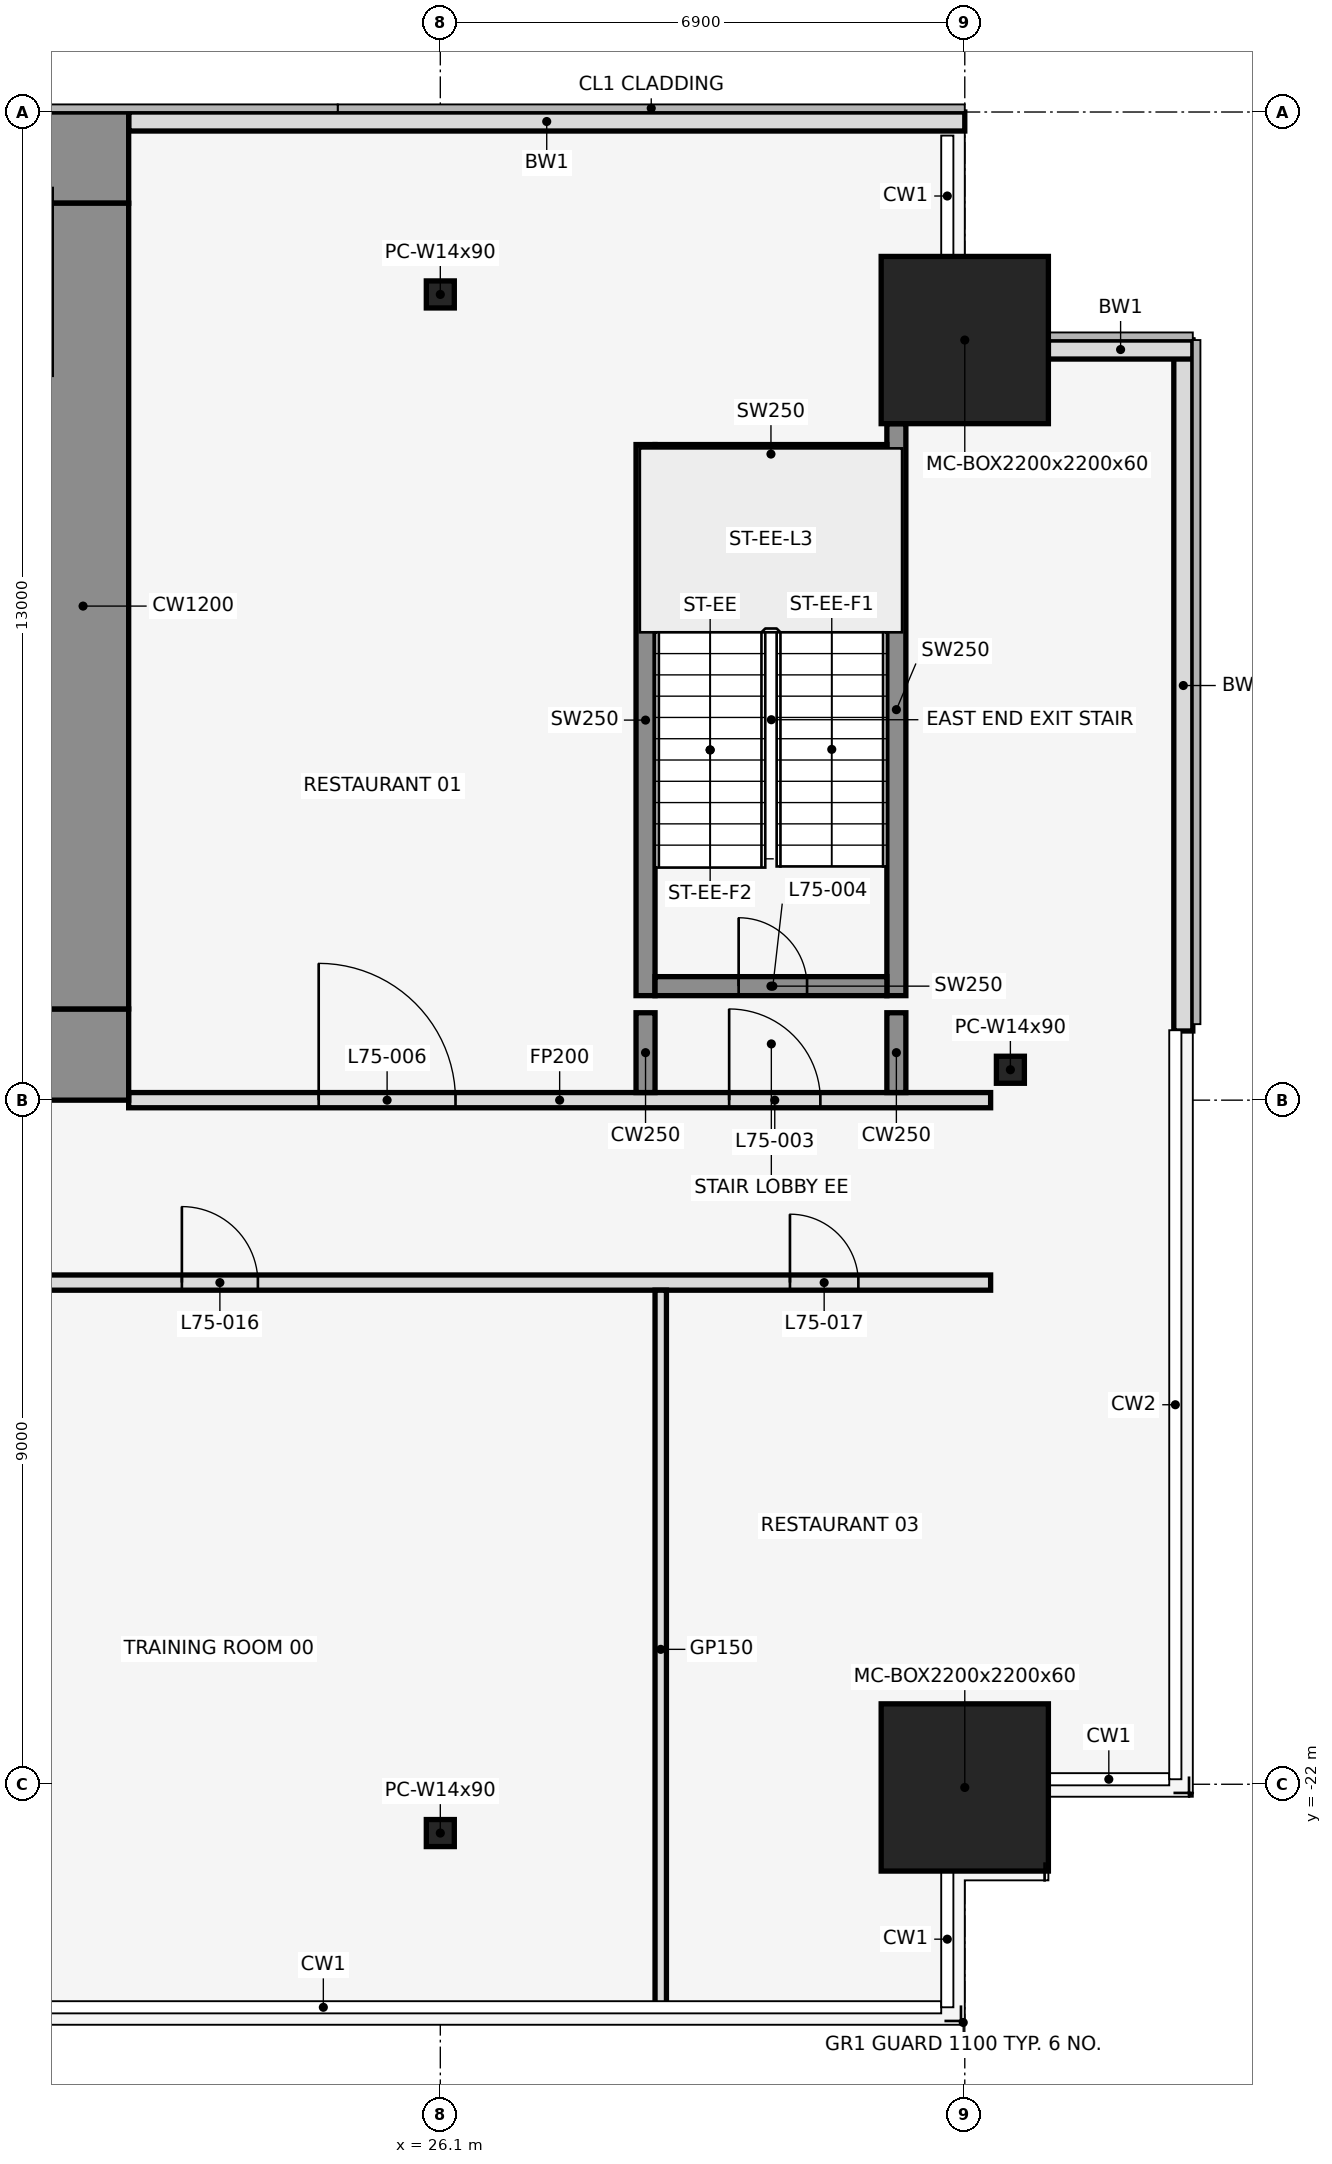
"""IFC4 building model, lengths in metres.
Left out: names, types, materials, properties, quantities, classifications, styles, units other than length and angle.
Written with IfcOpenShell. Run it as: python <this file> out.ifc"""

import sys

from ifc_helpers import new_model, si_unit, direction, frame, frame_2d, origin, origin_2d, place, context, subcontext, project, spatial, rectangle, hollow_rectangle, i_section, extrude, element, fill, save


model = new_model("IFC4")
c1 = context("Model", 3, precision=1e-05, world=origin(), true_north=direction((0.0, 1.0)))
c2 = subcontext(c1, "Body", "Model", "MODEL_VIEW")
j1 = project(units=[si_unit("LENGTHUNIT", "METRE"), si_unit("PLANEANGLEUNIT", "RADIAN")], contexts=[c1])
p1 = place(None, origin())
s1 = spatial("IfcSite", under=j1, at=p1, CompositionType="ELEMENT")
p2 = place(p1, origin())
s2 = spatial("IfcBuilding", under=s1, at=p2, CompositionType="ELEMENT")
p3 = place(p2, frame((0.0, 0.0, 333.5)))
s3 = spatial("IfcBuildingStorey", under=s2, at=p3, CompositionType="ELEMENT", Elevation=333.5)
for number, where, z_axis, x_axis in (
    (1, (26.1, -22.642, 0.0), (0.0, 0.0, 1.0), (1.0, 0.0, 0.0)),
    (2, (26.1, -2.4, 0.0), (0.0, 0.0, 1.0), (1.0, 0.0, 0.0)),
):
    element("IfcColumn", number, at=place(p3, frame(where, z_axis=z_axis, x_axis=x_axis)), inside=s3, PredefinedType="COLUMN", context=c2, shape_type="SweptSolid", body=[
        extrude(i_section(OverallWidth=0.368, OverallDepth=0.356, WebThickness=0.011, FlangeThickness=0.018, at=origin_2d()), origin(), (0.0, 0.0, 1.0), 4.5),
    ])
for number, where, z_axis, x_axis in (
    (3, (33.0, -22.042, 0.0), (0.0, 0.0, 1.0), (1.0, 0.0, 0.0)),
    (4, (33.0, -3.0, 0.0), (0.0, 0.0, 1.0), (1.0, 0.0, 0.0)),
):
    element("IfcColumn", number, at=place(p3, frame(where, z_axis=z_axis, x_axis=x_axis)), inside=s3, PredefinedType="COLUMN", context=c2, shape_type="SweptSolid", body=[
        extrude(hollow_rectangle(XDim=2.2, YDim=2.2, WallThickness=0.06, at=origin_2d()), origin(), (0.0, 0.0, 1.0), 4.5),
    ])
p4 = place(p3, frame((33.6, -12.6, 0.0), z_axis=(0.0, 0.0, 1.0), x_axis=(1.0, 0.0, 0.0)))
e5 = element("IfcColumn", 5, at=p4, inside=s3, PredefinedType="COLUMN", context=c2, shape_type="SweptSolid", body=[
    extrude(i_section(OverallWidth=0.368, OverallDepth=0.356, WebThickness=0.011, FlangeThickness=0.018, at=origin_2d()), origin(), (0.0, 0.0, 1.0), 4.5),
])
p5 = place(p3, frame((33.0, -0.125, 0.0), z_axis=(0.0, 0.0, 1.0), x_axis=(-1.0, 0.0, 0.0)))
e6 = element("IfcWall", 6, at=p5, inside=s3, PredefinedType="STANDARD", context=c2, shape_type="SweptSolid", body=[
    extrude(rectangle(XDim=11.0, YDim=0.25, at=frame_2d((5.5, 0.0))), origin(), (0.0, 0.0, 1.0), 4.35),
])
p6 = place(p3, frame((35.875, -12.09, 0.0), z_axis=(0.0, 0.0, 1.0), x_axis=(0.0, 1.0, 0.0)))
e7 = element("IfcWall", 7, at=p6, inside=s3, PredefinedType="STANDARD", context=c2, shape_type="SweptSolid", body=[
    extrude(rectangle(XDim=9.09, YDim=0.25, at=frame_2d((4.545, 0.0))), origin(), (0.0, 0.0, 1.0), 4.35),
])
p7 = place(p3, frame((36.0, -3.125, 0.0), z_axis=(0.0, 0.0, 1.0), x_axis=(-1.0, 0.0, 0.0)))
e8 = element("IfcWall", 8, at=p7, inside=s3, PredefinedType="STANDARD", context=c2, shape_type="SweptSolid", body=[
    extrude(rectangle(XDim=1.9, YDim=0.25, at=frame_2d((0.95, 0.0))), origin(), (0.0, 0.0, 1.0), 4.35),
])
p8 = place(p3, frame((28.8, -11.625, 0.0), z_axis=(0.0, 0.0, 1.0), x_axis=(0.0, 1.0, 0.0)))
e9 = element("IfcWall", 9, at=p8, inside=s3, PredefinedType="SHEAR", context=c2, shape_type="SweptSolid", body=[
    extrude(rectangle(XDim=7.25, YDim=0.25, at=frame_2d((3.625, 0.0))), origin(), (0.0, 0.0, 1.0), 4.5),
])
p9 = place(p3, frame((32.1, -11.625, 0.0), z_axis=(0.0, 0.0, 1.0), x_axis=(0.0, 1.0, 0.0)))
e10 = element("IfcWall", 10, at=p9, inside=s3, PredefinedType="SHEAR", context=c2, shape_type="SweptSolid", body=[
    extrude(rectangle(XDim=7.525, YDim=0.25, at=frame_2d((3.762, 0.0))), origin(), (0.0, 0.0, 1.0), 4.5),
])
p10 = place(p3, frame((28.925, -11.5, 0.0), z_axis=(0.0, 0.0, 1.0), x_axis=(1.0, 0.0, 0.0)))
e11 = element("IfcWall", 11, at=p10, inside=s3, PredefinedType="SHEAR", context=c2, shape_type="SweptSolid", body=[
    extrude(rectangle(XDim=3.05, YDim=0.25, at=frame_2d((1.525, 0.0))), origin(), (0.0, 0.0, 1.0), 4.5),
])
p11 = place(p10, frame((1.1, 0.0, 0.0)))
e12 = element("IfcOpeningElement", 12, at=p11, cuts=e11, PredefinedType="OPENING", context=c2, shape_type="SweptSolid", body=[
    extrude(rectangle(XDim=0.9, YDim=2.1, at=frame_2d((0.45, 1.05))), frame((0.0, 0.137, 0.0), z_axis=(0.0, -1.0, 0.0), x_axis=(1.0, 0.0, 0.0)), (0.0, 0.0, 1.0), 0.274),
])
p12 = place(p3, frame((28.925, -4.5, 0.0), z_axis=(0.0, 0.0, 1.0), x_axis=(1.0, 0.0, 0.0)))
e13 = element("IfcWall", 13, at=p12, inside=s3, PredefinedType="SHEAR", context=c2, shape_type="SweptSolid", body=[
    extrude(rectangle(XDim=3.05, YDim=0.25, at=frame_2d((1.525, 0.0))), origin(), (0.0, 0.0, 1.0), 4.5),
])
p13 = place(p3, frame((1.4, -15.4, 0.0), z_axis=(0.0, 0.0, 1.0), x_axis=(1.0, 0.0, 0.0)))
e14 = element("IfcWall", 14, at=p13, inside=s3, PredefinedType="PARTITIONING", context=c2, shape_type="SweptSolid", body=[
    extrude(rectangle(XDim=31.94, YDim=0.2, at=frame_2d((15.97, 0.0))), origin(), (0.0, 0.0, 1.0), 3.339),
])
p14 = place(p13, frame((1.7, 0.0, 0.0)))
e15 = element("IfcOpeningElement", 15, at=p14, cuts=e14, PredefinedType="OPENING", context=c2, shape_type="SweptSolid", body=[
    extrude(rectangle(XDim=1.0, YDim=2.1, at=frame_2d((0.5, 1.05))), frame((0.0, 0.112, 0.0), z_axis=(0.0, -1.0, 0.0), x_axis=(1.0, 0.0, 0.0)), (0.0, 0.0, 1.0), 0.224),
])
p15 = place(p13, frame((9.3, 0.0, 0.0)))
e16 = element("IfcOpeningElement", 16, at=p15, cuts=e14, PredefinedType="OPENING", context=c2, shape_type="SweptSolid", body=[
    extrude(rectangle(XDim=1.8, YDim=2.1, at=frame_2d((0.9, 1.05))), frame((0.0, 0.112, 0.0), z_axis=(0.0, -1.0, 0.0), x_axis=(1.0, 0.0, 0.0)), (0.0, 0.0, 1.0), 0.224),
])
p16 = place(p13, frame((21.3, 0.0, 0.0)))
e17 = element("IfcOpeningElement", 17, at=p16, cuts=e14, PredefinedType="OPENING", context=c2, shape_type="SweptSolid", body=[
    extrude(rectangle(XDim=1.0, YDim=2.1, at=frame_2d((0.5, 1.05))), frame((0.0, 0.112, 0.0), z_axis=(0.0, -1.0, 0.0), x_axis=(1.0, 0.0, 0.0)), (0.0, 0.0, 1.0), 0.224),
])
p17 = place(p13, frame((29.3, 0.0, 0.0)))
e18 = element("IfcOpeningElement", 18, at=p17, cuts=e14, PredefinedType="OPENING", context=c2, shape_type="SweptSolid", body=[
    extrude(rectangle(XDim=0.9, YDim=2.1, at=frame_2d((0.45, 1.05))), frame((0.0, 0.112, 0.0), z_axis=(0.0, -1.0, 0.0), x_axis=(1.0, 0.0, 0.0)), (0.0, 0.0, 1.0), 0.224),
])
p18 = place(p3, frame((22.0, -13.0, 0.0), z_axis=(0.0, 0.0, 1.0), x_axis=(1.0, 0.0, 0.0)))
e19 = element("IfcWall", 19, at=p18, inside=s3, PredefinedType="PARTITIONING", context=c2, shape_type="SweptSolid", body=[
    extrude(rectangle(XDim=11.34, YDim=0.2, at=frame_2d((5.67, 0.0))), origin(), (0.0, 0.0, 1.0), 3.339),
])
p19 = place(p18, frame((7.9, 0.0, 0.0)))
e20 = element("IfcOpeningElement", 20, at=p19, cuts=e19, PredefinedType="OPENING", context=c2, shape_type="SweptSolid", body=[
    extrude(rectangle(XDim=1.2, YDim=2.1, at=frame_2d((0.6, 1.05))), frame((0.0, 0.112, 0.0), z_axis=(0.0, -1.0, 0.0), x_axis=(1.0, 0.0, 0.0)), (0.0, 0.0, 1.0), 0.224),
])
p20 = place(p18, frame((2.5, 0.0, 0.0)))
e21 = element("IfcOpeningElement", 21, at=p20, cuts=e19, PredefinedType="OPENING", context=c2, shape_type="SweptSolid", body=[
    extrude(rectangle(XDim=1.8, YDim=2.1, at=frame_2d((0.9, 1.05))), frame((0.0, 0.112, 0.0), z_axis=(0.0, -1.0, 0.0), x_axis=(1.0, 0.0, 0.0)), (0.0, 0.0, 1.0), 0.224),
])
p21 = place(p3, frame((28.8, -12.9, 0.0), z_axis=(0.0, 0.0, 1.0), x_axis=(0.0, 1.0, 0.0)))
e22 = element("IfcWall", 22, at=p21, inside=s3, PredefinedType="SHEAR", context=c2, shape_type="SweptSolid", body=[
    extrude(rectangle(XDim=1.05, YDim=0.25, at=frame_2d((0.525, 0.0))), origin(), (0.0, 0.0, 1.0), 4.5),
])
p22 = place(p3, frame((29.0, -24.95, 0.0), z_axis=(0.0, 0.0, 1.0), x_axis=(0.0, 1.0, 0.0)))
e23 = element("IfcWall", 23, at=p22, inside=s3, PredefinedType="PARTITIONING", context=c2, shape_type="SweptSolid", body=[
    extrude(rectangle(XDim=9.45, YDim=0.15, at=frame_2d((4.725, 0.0))), origin(), (0.0, 0.0, 1.0), 3.339),
])
p23 = place(p3, frame((32.1, -12.9, 0.0), z_axis=(0.0, 0.0, 1.0), x_axis=(0.0, 1.0, 0.0)))
e24 = element("IfcWall", 24, at=p23, inside=s3, PredefinedType="SHEAR", context=c2, shape_type="SweptSolid", body=[
    extrude(rectangle(XDim=1.05, YDim=0.25, at=frame_2d((0.525, 0.0))), origin(), (0.0, 0.0, 1.0), 4.5),
])
p24 = place(p3, frame((-22.0, -0.6, 0.0), z_axis=(0.0, 0.0, 1.0), x_axis=(1.0, 0.0, 0.0)))
e25 = element("IfcWall", 25, at=p24, inside=s3, PredefinedType="SHEAR", context=c2, shape_type="SweptSolid", body=[
    extrude(rectangle(XDim=44.0, YDim=1.2, at=frame_2d((22.0, 0.0))), origin(), (0.0, 0.0, 1.0), 4.5),
])
p25 = place(p24, frame((18.55, 0.0, 0.0)))
e26 = element("IfcOpeningElement", 26, at=p25, cuts=e25, PredefinedType="OPENING", context=c2, shape_type="SweptSolid", body=[
    extrude(rectangle(XDim=0.9, YDim=2.1, at=frame_2d((0.45, 1.05))), frame((0.0, 0.612, 0.0), z_axis=(0.0, -1.0, 0.0), x_axis=(1.0, 0.0, 0.0)), (0.0, 0.0, 1.0), 1.224),
])
p26 = place(p24, frame((24.55, 0.0, 0.0)))
e27 = element("IfcOpeningElement", 27, at=p26, cuts=e25, PredefinedType="OPENING", context=c2, shape_type="SweptSolid", body=[
    extrude(rectangle(XDim=0.9, YDim=2.1, at=frame_2d((0.45, 1.05))), frame((0.0, 0.612, 0.0), z_axis=(0.0, -1.0, 0.0), x_axis=(1.0, 0.0, 0.0)), (0.0, 0.0, 1.0), 1.224),
])
p27 = place(p3, frame((-22.0, -12.4, 0.0), z_axis=(0.0, 0.0, 1.0), x_axis=(1.0, 0.0, 0.0)))
e28 = element("IfcWall", 28, at=p27, inside=s3, PredefinedType="SHEAR", context=c2, shape_type="SweptSolid", body=[
    extrude(rectangle(XDim=44.0, YDim=1.2, at=frame_2d((22.0, 0.0))), origin(), (0.0, 0.0, 1.0), 4.5),
])
p28 = place(p27, frame((2.2, 0.0, 0.0)))
e29 = element("IfcOpeningElement", 29, at=p28, cuts=e28, PredefinedType="OPENING", context=c2, shape_type="SweptSolid", body=[
    extrude(rectangle(XDim=1.2, YDim=2.1, at=frame_2d((0.6, 1.05))), frame((0.0, 0.612, 0.0), z_axis=(0.0, -1.0, 0.0), x_axis=(1.0, 0.0, 0.0)), (0.0, 0.0, 1.0), 1.224),
])
p29 = place(p27, frame((21.4, 0.0, 0.0)))
e30 = element("IfcOpeningElement", 30, at=p29, cuts=e28, PredefinedType="OPENING", context=c2, shape_type="SweptSolid", body=[
    extrude(rectangle(XDim=1.2, YDim=2.1, at=frame_2d((0.6, 1.05))), frame((0.0, 0.612, 0.0), z_axis=(0.0, -1.0, 0.0), x_axis=(1.0, 0.0, 0.0)), (0.0, 0.0, 1.0), 1.224),
])
p30 = place(p27, frame((40.6, 0.0, 0.0)))
e31 = element("IfcOpeningElement", 31, at=p30, cuts=e28, PredefinedType="OPENING", context=c2, shape_type="SweptSolid", body=[
    extrude(rectangle(XDim=1.2, YDim=2.1, at=frame_2d((0.6, 1.05))), frame((0.0, 0.612, 0.0), z_axis=(0.0, -1.0, 0.0), x_axis=(1.0, 0.0, 0.0)), (0.0, 0.0, 1.0), 1.224),
])
p31 = place(p27, frame((16.0, 0.0, 0.0)))
e32 = element("IfcOpeningElement", 32, at=p31, cuts=e28, PredefinedType="OPENING", context=c2, shape_type="SweptSolid", body=[
    extrude(rectangle(XDim=1.8, YDim=2.1, at=frame_2d((0.9, 1.05))), frame((0.0, 0.612, 0.0), z_axis=(0.0, -1.0, 0.0), x_axis=(1.0, 0.0, 0.0)), (0.0, 0.0, 1.0), 1.224),
])
p32 = place(p27, frame((6.3, 0.0, 0.0)))
e33 = element("IfcOpeningElement", 33, at=p32, cuts=e28, PredefinedType="OPENING", context=c2, shape_type="SweptSolid", body=[
    extrude(rectangle(XDim=1.2, YDim=2.1, at=frame_2d((0.6, 1.05))), frame((0.0, 0.612, 0.0), z_axis=(0.0, -1.0, 0.0), x_axis=(1.0, 0.0, 0.0)), (0.0, 0.0, 1.0), 1.224),
])
p33 = place(p27, frame((26.2, 0.0, 0.0)))
e34 = element("IfcOpeningElement", 34, at=p33, cuts=e28, PredefinedType="OPENING", context=c2, shape_type="SweptSolid", body=[
    extrude(rectangle(XDim=1.8, YDim=2.1, at=frame_2d((0.9, 1.05))), frame((0.0, 0.612, 0.0), z_axis=(0.0, -1.0, 0.0), x_axis=(1.0, 0.0, 0.0)), (0.0, 0.0, 1.0), 1.224),
])
p34 = place(p27, frame((36.5, 0.0, 0.0)))
e35 = element("IfcOpeningElement", 35, at=p34, cuts=e28, PredefinedType="OPENING", context=c2, shape_type="SweptSolid", body=[
    extrude(rectangle(XDim=1.2, YDim=2.1, at=frame_2d((0.6, 1.05))), frame((0.0, 0.612, 0.0), z_axis=(0.0, -1.0, 0.0), x_axis=(1.0, 0.0, 0.0)), (0.0, 0.0, 1.0), 1.224),
])
p35 = place(p3, frame((21.4, -11.8, 0.0), z_axis=(0.0, 0.0, 1.0), x_axis=(0.0, 1.0, 0.0)))
e36 = element("IfcWall", 36, at=p35, inside=s3, PredefinedType="SHEAR", context=c2, shape_type="SweptSolid", body=[
    extrude(rectangle(XDim=10.6, YDim=1.2, at=frame_2d((5.3, 0.0))), origin(), (0.0, 0.0, 1.0), 4.5),
])
p36 = place(p19, origin())
e37 = element("IfcDoor", 37, at=p36, inside=s3, OperationType="SINGLE_SWING_RIGHT", PredefinedType="DOOR", context=c2, shape_type="SweptSolid", body=[
    extrude(rectangle(XDim=1.2, YDim=2.1, at=frame_2d((0.6, 1.05))), frame((0.0, 0.025, 0.0), z_axis=(0.0, -1.0, 0.0), x_axis=(1.0, 0.0, 0.0)), (0.0, 0.0, 1.0), 0.05),
])
fill(e20, e37)
p37 = place(p11, origin())
e38 = element("IfcDoor", 38, at=p37, inside=s3, OperationType="SINGLE_SWING_LEFT", PredefinedType="DOOR", context=c2, shape_type="SweptSolid", body=[
    extrude(rectangle(XDim=0.9, YDim=2.1, at=frame_2d((0.45, 1.05))), frame((0.0, 0.025, 0.0), z_axis=(0.0, -1.0, 0.0), x_axis=(1.0, 0.0, 0.0)), (0.0, 0.0, 1.0), 0.05),
])
fill(e12, e38)
p38 = place(p20, origin())
e39 = element("IfcDoor", 39, at=p38, inside=s3, OperationType="SINGLE_SWING_LEFT", PredefinedType="DOOR", context=c2, shape_type="SweptSolid", body=[
    extrude(rectangle(XDim=1.8, YDim=2.1, at=frame_2d((0.9, 1.05))), frame((0.0, 0.025, 0.0), z_axis=(0.0, -1.0, 0.0), x_axis=(1.0, 0.0, 0.0)), (0.0, 0.0, 1.0), 0.05),
])
fill(e21, e39)
p39 = place(p16, frame((1.0, 0.0, 0.0), z_axis=(0.0, 0.0, 1.0), x_axis=(-1.0, 0.0, 0.0)))
e40 = element("IfcDoor", 40, at=p39, inside=s3, OperationType="SINGLE_SWING_LEFT", PredefinedType="DOOR", context=c2, shape_type="SweptSolid", body=[
    extrude(rectangle(XDim=1.0, YDim=2.1, at=frame_2d((0.5, 1.05))), frame((0.0, 0.025, 0.0), z_axis=(0.0, -1.0, 0.0), x_axis=(1.0, 0.0, 0.0)), (0.0, 0.0, 1.0), 0.05),
])
fill(e17, e40)
p40 = place(p17, frame((0.9, 0.0, 0.0), z_axis=(0.0, 0.0, 1.0), x_axis=(-1.0, 0.0, 0.0)))
e41 = element("IfcDoor", 41, at=p40, inside=s3, OperationType="SINGLE_SWING_RIGHT", PredefinedType="DOOR", context=c2, shape_type="SweptSolid", body=[
    extrude(rectangle(XDim=0.9, YDim=2.1, at=frame_2d((0.45, 1.05))), frame((0.0, 0.025, 0.0), z_axis=(0.0, -1.0, 0.0), x_axis=(1.0, 0.0, 0.0)), (0.0, 0.0, 1.0), 0.05),
])
fill(e18, e41)
save(model, sys.argv[1])
